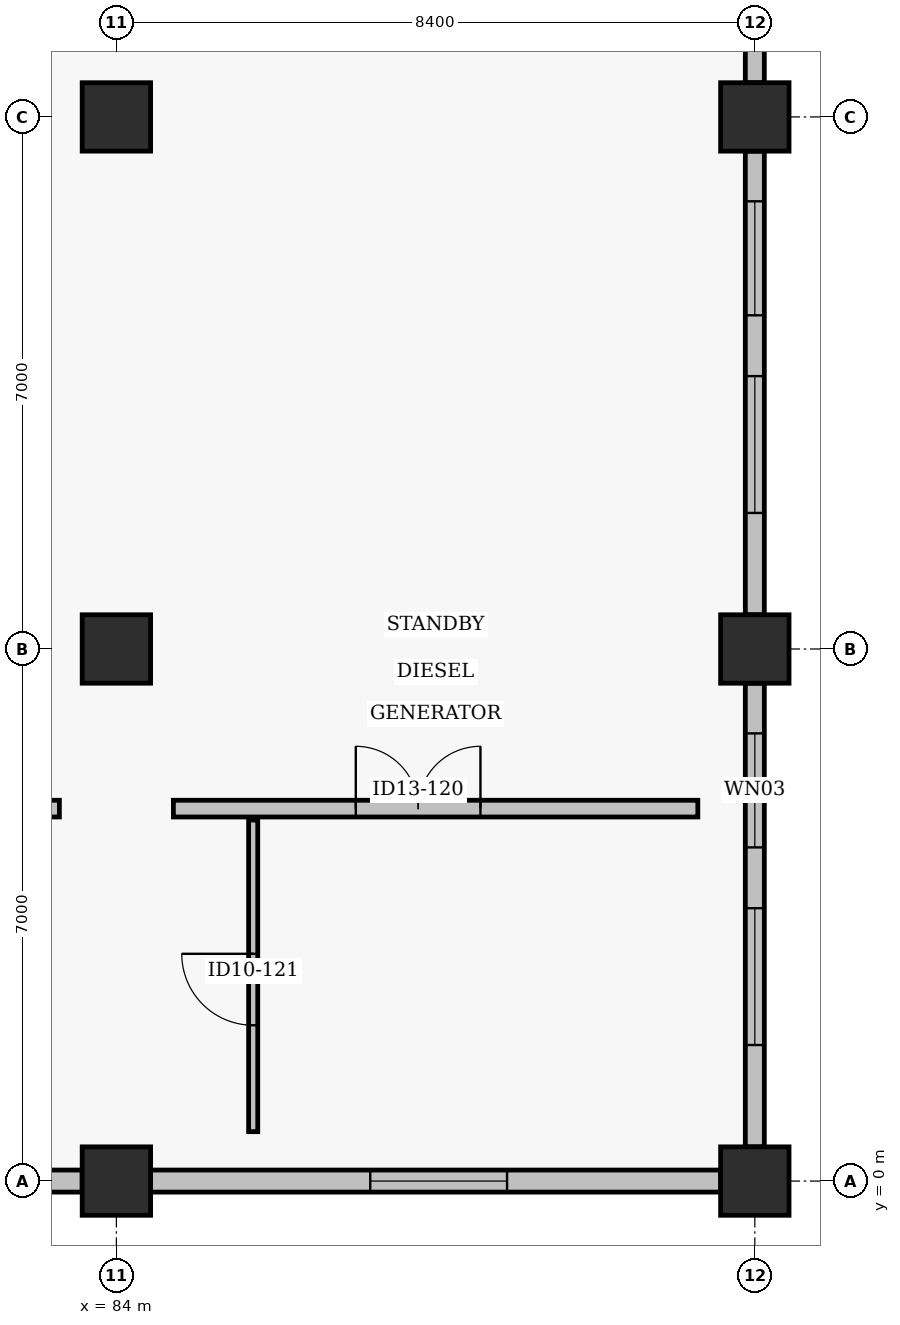
"""IFC4 building model, lengths in metres.
Left out: names, types, materials, properties, quantities, classifications, styles, units other than length and angle.
Written with IfcOpenShell. Run it as: python <this file> out.ifc"""

import sys

from ifc_helpers import new_model, si_unit, direction, frame, frame_2d, origin, origin_2d, place, context, subcontext, project, spatial, rectangle, extrude, element, fill, save


model = new_model("IFC4")
c1 = context("Model", 3, precision=1e-05, world=origin(), true_north=direction((0.0, 1.0)))
c2 = subcontext(c1, "Body", "Model", "MODEL_VIEW")
j1 = project(units=[si_unit("LENGTHUNIT", "METRE"), si_unit("PLANEANGLEUNIT", "RADIAN")], contexts=[c1])
p1 = place(None, origin())
s1 = spatial("IfcSite", under=j1, at=p1, CompositionType="ELEMENT")
p2 = place(p1, origin())
s2 = spatial("IfcBuilding", under=s1, at=p2, CompositionType="ELEMENT")
p3 = place(p2, origin())
s3 = spatial("IfcBuildingStorey", under=s2, at=p3, CompositionType="ELEMENT", Elevation=0.0)
for number, where, z_axis, x_axis in (
    (1, (84.0, 0.0, -0.46), (0.0, 0.0, 1.0), (1.0, 0.0, 0.0)),
    (2, (84.0, 7.0, -0.46), (0.0, 0.0, 1.0), (1.0, 0.0, 0.0)),
    (3, (84.0, 14.0, -0.46), (0.0, 0.0, 1.0), (1.0, 0.0, 0.0)),
    (4, (92.4, 0.0, -0.46), (0.0, 0.0, 1.0), (1.0, 0.0, 0.0)),
    (5, (92.4, 7.0, -0.46), (0.0, 0.0, 1.0), (1.0, 0.0, 0.0)),
    (6, (92.4, 14.0, -0.46), (0.0, 0.0, 1.0), (1.0, 0.0, 0.0)),
):
    element("IfcColumn", number, at=place(p3, frame(where, z_axis=z_axis, x_axis=x_axis)), inside=s3, PredefinedType="COLUMN", context=c2, shape_type="SweptSolid", body=[
        extrude(rectangle(XDim=0.9, YDim=0.9, at=origin_2d()), origin(), (0.0, 0.0, 1.0), 5.9),
    ])
p4 = place(p3, frame((76.05, 0.0, 0.0), z_axis=(0.0, 0.0, 1.0), x_axis=(1.0, 0.0, 0.0)))
e7 = element("IfcWall", 7, at=p4, inside=s3, PredefinedType="SOLIDWALL", context=c2, shape_type="SweptSolid", body=[
    extrude(rectangle(XDim=7.5, YDim=0.29, at=frame_2d((3.75, 0.0))), origin(), (0.0, 0.0, 1.0), 4.625),
])
p5 = place(p4, frame((2.89, 0.0, 1.05)))
e8 = element("IfcOpeningElement", 8, at=p5, cuts=e7, PredefinedType="OPENING", context=c2, shape_type="SweptSolid", body=[
    extrude(rectangle(XDim=2.0, YDim=1.45, at=frame_2d((1.0, 0.725))), frame((0.0, 0.155, 0.0), z_axis=(0.0, -1.0, 0.0), x_axis=(1.0, 0.0, 0.0)), (0.0, 0.0, 1.0), 0.31),
])
p6 = place(p3, frame((84.45, 0.0, 0.0), z_axis=(0.0, 0.0, 1.0), x_axis=(1.0, 0.0, 0.0)))
e9 = element("IfcWall", 9, at=p6, inside=s3, PredefinedType="SOLIDWALL", context=c2, shape_type="SweptSolid", body=[
    extrude(rectangle(XDim=7.5, YDim=0.29, at=frame_2d((3.75, 0.0))), origin(), (0.0, 0.0, 1.0), 4.625),
])
p7 = place(p6, frame((2.89, 0.0, 1.05)))
e10 = element("IfcOpeningElement", 10, at=p7, cuts=e9, PredefinedType="OPENING", context=c2, shape_type="SweptSolid", body=[
    extrude(rectangle(XDim=1.8, YDim=1.5, at=frame_2d((0.9, 0.75))), frame((0.0, 0.155, 0.0), z_axis=(0.0, -1.0, 0.0), x_axis=(1.0, 0.0, 0.0)), (0.0, 0.0, 1.0), 0.31),
])
p8 = place(p3, frame((92.4, 0.45, 0.0), z_axis=(0.0, 0.0, 1.0), x_axis=(0.0, 1.0, 0.0)))
e11 = element("IfcWall", 11, at=p8, inside=s3, PredefinedType="SOLIDWALL", context=c2, shape_type="SweptSolid", body=[
    extrude(rectangle(XDim=6.1, YDim=0.25, at=frame_2d((3.05, 0.0))), origin(), (0.0, 0.0, 1.0), 4.625),
])
p9 = place(p8, frame((1.34, 0.0, 0.95)))
e12 = element("IfcOpeningElement", 12, at=p9, cuts=e11, PredefinedType="OPENING", context=c2, shape_type="SweptSolid", body=[
    extrude(rectangle(XDim=1.8, YDim=1.5, at=frame_2d((0.9, 0.75))), frame((0.0, 0.135, 0.0), z_axis=(0.0, -1.0, 0.0), x_axis=(1.0, 0.0, 0.0)), (0.0, 0.0, 1.0), 0.27),
])
p10 = place(p8, frame((3.94, 0.0, 0.95)))
e13 = element("IfcOpeningElement", 13, at=p10, cuts=e11, PredefinedType="OPENING", context=c2, shape_type="SweptSolid", body=[
    extrude(rectangle(XDim=1.5, YDim=1.5, at=frame_2d((0.75, 0.75))), frame((0.0, 0.135, 0.0), z_axis=(0.0, -1.0, 0.0), x_axis=(1.0, 0.0, 0.0)), (0.0, 0.0, 1.0), 0.27),
])
p11 = place(p3, frame((92.4, 7.45, 0.0), z_axis=(0.0, 0.0, 1.0), x_axis=(0.0, 1.0, 0.0)))
e14 = element("IfcWall", 14, at=p11, inside=s3, PredefinedType="SOLIDWALL", context=c2, shape_type="SweptSolid", body=[
    extrude(rectangle(XDim=6.1, YDim=0.25, at=frame_2d((3.05, 0.0))), origin(), (0.0, 0.0, 1.0), 4.625),
])
p12 = place(p11, frame((1.34, 0.0, 0.95)))
e15 = element("IfcOpeningElement", 15, at=p12, cuts=e14, PredefinedType="OPENING", context=c2, shape_type="SweptSolid", body=[
    extrude(rectangle(XDim=1.8, YDim=1.5, at=frame_2d((0.9, 0.75))), frame((0.0, 0.135, 0.0), z_axis=(0.0, -1.0, 0.0), x_axis=(1.0, 0.0, 0.0)), (0.0, 0.0, 1.0), 0.27),
])
p13 = place(p11, frame((3.94, 0.0, 0.95)))
e16 = element("IfcOpeningElement", 16, at=p13, cuts=e14, PredefinedType="OPENING", context=c2, shape_type="SweptSolid", body=[
    extrude(rectangle(XDim=1.5, YDim=1.5, at=frame_2d((0.75, 0.75))), frame((0.0, 0.135, 0.0), z_axis=(0.0, -1.0, 0.0), x_axis=(1.0, 0.0, 0.0)), (0.0, 0.0, 1.0), 0.27),
])
p14 = place(p3, frame((92.4, 14.45, 0.0), z_axis=(0.0, 0.0, 1.0), x_axis=(0.0, 1.0, 0.0)))
e17 = element("IfcWall", 17, at=p14, inside=s3, PredefinedType="SOLIDWALL", context=c2, shape_type="SweptSolid", body=[
    extrude(rectangle(XDim=7.1, YDim=0.25, at=frame_2d((3.55, 0.0))), origin(), (0.0, 0.0, 1.0), 4.625),
])
p15 = place(p14, frame((1.34, 0.0, 0.95)))
e18 = element("IfcOpeningElement", 18, at=p15, cuts=e17, PredefinedType="OPENING", context=c2, shape_type="SweptSolid", body=[
    extrude(rectangle(XDim=1.8, YDim=1.5, at=frame_2d((0.9, 0.75))), frame((0.0, 0.135, 0.0), z_axis=(0.0, -1.0, 0.0), x_axis=(1.0, 0.0, 0.0)), (0.0, 0.0, 1.0), 0.27),
])
p16 = place(p14, frame((3.94, 0.0, 0.95)))
e19 = element("IfcOpeningElement", 19, at=p16, cuts=e17, PredefinedType="OPENING", context=c2, shape_type="SweptSolid", body=[
    extrude(rectangle(XDim=1.5, YDim=1.5, at=frame_2d((0.75, 0.75))), frame((0.0, 0.135, 0.0), z_axis=(0.0, -1.0, 0.0), x_axis=(1.0, 0.0, 0.0)), (0.0, 0.0, 1.0), 0.27),
])
p17 = place(p3, frame((76.35, 4.9, 0.0), z_axis=(0.0, 0.0, 1.0), x_axis=(1.0, 0.0, 0.0)))
e20 = element("IfcWall", 20, at=p17, inside=s3, PredefinedType="SOLIDWALL", context=c2, shape_type="SweptSolid", body=[
    extrude(rectangle(XDim=6.9, YDim=0.22, at=frame_2d((3.45, 0.0))), origin(), (0.0, 0.0, 1.0), 2.55),
])
p18 = place(p17, frame((2.4, 0.0, 0.0)))
e21 = element("IfcOpeningElement", 21, at=p18, cuts=e20, PredefinedType="OPENING", context=c2, shape_type="SweptSolid", body=[
    extrude(rectangle(XDim=1.64, YDim=2.16, at=frame_2d((0.82, 1.08))), frame((0.0, 0.12, 0.0), z_axis=(0.0, -1.0, 0.0), x_axis=(1.0, 0.0, 0.0)), (0.0, 0.0, 1.0), 0.24),
])
p19 = place(p3, frame((84.75, 4.9, 0.0), z_axis=(0.0, 0.0, 1.0), x_axis=(1.0, 0.0, 0.0)))
e22 = element("IfcWall", 22, at=p19, inside=s3, PredefinedType="SOLIDWALL", context=c2, shape_type="SweptSolid", body=[
    extrude(rectangle(XDim=6.9, YDim=0.22, at=frame_2d((3.45, 0.0))), origin(), (0.0, 0.0, 1.0), 2.55),
])
p20 = place(p19, frame((2.4, 0.0, 0.0)))
e23 = element("IfcOpeningElement", 23, at=p20, cuts=e22, PredefinedType="OPENING", context=c2, shape_type="SweptSolid", body=[
    extrude(rectangle(XDim=1.64, YDim=2.16, at=frame_2d((0.82, 1.08))), frame((0.0, 0.12, 0.0), z_axis=(0.0, -1.0, 0.0), x_axis=(1.0, 0.0, 0.0)), (0.0, 0.0, 1.0), 0.24),
])
p21 = place(p3, frame((85.8, 0.65, 0.0), z_axis=(0.0, 0.0, 1.0), x_axis=(0.0, 1.0, 0.0)))
e24 = element("IfcWall", 24, at=p21, inside=s3, PredefinedType="PARTITIONING", context=c2, shape_type="SweptSolid", body=[
    extrude(rectangle(XDim=4.1, YDim=0.12, at=frame_2d((2.05, 0.0))), origin(), (0.0, 0.0, 1.0), 2.5),
])
p22 = place(p21, frame((1.4, 0.0, 0.0)))
e25 = element("IfcOpeningElement", 25, at=p22, cuts=e24, PredefinedType="OPENING", context=c2, shape_type="SweptSolid", body=[
    extrude(rectangle(XDim=0.94, YDim=2.08, at=frame_2d((0.47, 1.04))), frame((0.0, 0.07, 0.0), z_axis=(0.0, -1.0, 0.0), x_axis=(1.0, 0.0, 0.0)), (0.0, 0.0, 1.0), 0.14),
])
p23 = place(p7, origin())
e26 = element("IfcWindow", 26, at=p23, inside=s3, PartitioningType="DOUBLE_PANEL_VERTICAL", PredefinedType="WINDOW", context=c2, shape_type="SweptSolid", body=[
    extrude(rectangle(XDim=1.8, YDim=1.5, at=frame_2d((0.9, 0.75))), frame((0.0, 0.03, 0.0), z_axis=(0.0, -1.0, 0.0), x_axis=(1.0, 0.0, 0.0)), (0.0, 0.0, 1.0), 0.06),
])
fill(e10, e26)
p24 = place(p9, origin())
e27 = element("IfcWindow", 27, at=p24, inside=s3, PartitioningType="DOUBLE_PANEL_VERTICAL", PredefinedType="WINDOW", context=c2, shape_type="SweptSolid", body=[
    extrude(rectangle(XDim=1.8, YDim=1.5, at=frame_2d((0.9, 0.75))), frame((0.0, 0.03, 0.0), z_axis=(0.0, -1.0, 0.0), x_axis=(1.0, 0.0, 0.0)), (0.0, 0.0, 1.0), 0.06),
])
fill(e12, e27)
p25 = place(p10, origin())
e28 = element("IfcWindow", 28, at=p25, inside=s3, PartitioningType="SINGLE_PANEL", PredefinedType="WINDOW", context=c2, shape_type="SweptSolid", body=[
    extrude(rectangle(XDim=1.5, YDim=1.5, at=frame_2d((0.75, 0.75))), frame((0.0, 0.03, 0.0), z_axis=(0.0, -1.0, 0.0), x_axis=(1.0, 0.0, 0.0)), (0.0, 0.0, 1.0), 0.06),
])
fill(e13, e28)
p26 = place(p12, origin())
e29 = element("IfcWindow", 29, at=p26, inside=s3, PartitioningType="DOUBLE_PANEL_VERTICAL", PredefinedType="WINDOW", context=c2, shape_type="SweptSolid", body=[
    extrude(rectangle(XDim=1.8, YDim=1.5, at=frame_2d((0.9, 0.75))), frame((0.0, 0.03, 0.0), z_axis=(0.0, -1.0, 0.0), x_axis=(1.0, 0.0, 0.0)), (0.0, 0.0, 1.0), 0.06),
])
fill(e15, e29)
p27 = place(p13, origin())
e30 = element("IfcWindow", 30, at=p27, inside=s3, PartitioningType="SINGLE_PANEL", PredefinedType="WINDOW", context=c2, shape_type="SweptSolid", body=[
    extrude(rectangle(XDim=1.5, YDim=1.5, at=frame_2d((0.75, 0.75))), frame((0.0, 0.03, 0.0), z_axis=(0.0, -1.0, 0.0), x_axis=(1.0, 0.0, 0.0)), (0.0, 0.0, 1.0), 0.06),
])
fill(e16, e30)
p28 = place(p20, origin())
e31 = element("IfcDoor", 31, at=p28, inside=s3, OperationType="DOUBLE_DOOR_SINGLE_SWING", PredefinedType="DOOR", context=c2, shape_type="SweptSolid", body=[
    extrude(rectangle(XDim=1.64, YDim=2.16, at=frame_2d((0.82, 1.08))), frame((0.0, 0.025, 0.0), z_axis=(0.0, -1.0, 0.0), x_axis=(1.0, 0.0, 0.0)), (0.0, 0.0, 1.0), 0.05),
])
fill(e23, e31)
p29 = place(p22, origin())
e32 = element("IfcDoor", 32, at=p29, inside=s3, OperationType="SINGLE_SWING_RIGHT", PredefinedType="DOOR", context=c2, shape_type="SweptSolid", body=[
    extrude(rectangle(XDim=0.94, YDim=2.08, at=frame_2d((0.47, 1.04))), frame((0.0, 0.025, 0.0), z_axis=(0.0, -1.0, 0.0), x_axis=(1.0, 0.0, 0.0)), (0.0, 0.0, 1.0), 0.05),
])
fill(e25, e32)
save(model, sys.argv[1])
